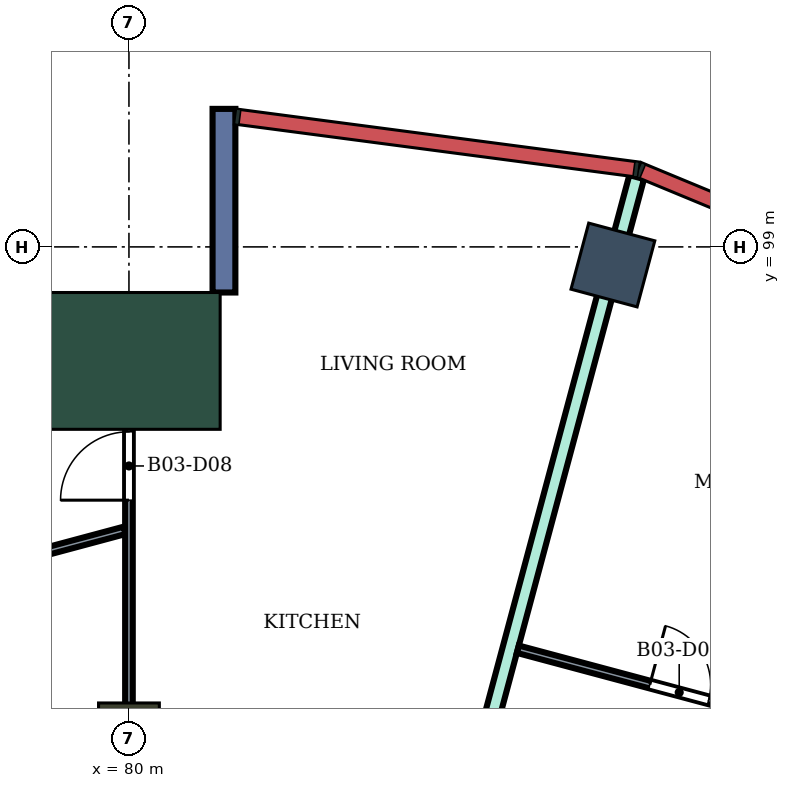
"""IFC4 building model, lengths in metres.
Left out: names, types, materials, properties, quantities, classifications, styles, units other than length and angle.
Written with IfcOpenShell. Run it as: python <this file> out.ifc"""

import sys

from ifc_helpers import new_model, si_unit, direction, frame, frame_2d, origin, origin_2d, place, context, subcontext, project, spatial, rectangle, extrude, element, fill, save


model = new_model("IFC4")
c1 = context("Model", 3, precision=1e-05, world=origin(), true_north=direction((0.0, 1.0)))
c2 = subcontext(c1, "Body", "Model", "MODEL_VIEW")
j1 = project(units=[si_unit("LENGTHUNIT", "METRE"), si_unit("PLANEANGLEUNIT", "RADIAN")], contexts=[c1])
p1 = place(None, origin())
s1 = spatial("IfcSite", under=j1, at=p1, CompositionType="ELEMENT")
p2 = place(p1, origin())
s2 = spatial("IfcBuilding", under=s1, at=p2, CompositionType="ELEMENT")
p3 = place(p2, frame((0.0, 0.0, 241.5)))
s3 = spatial("IfcBuildingStorey", under=s2, at=p3, CompositionType="ELEMENT", Elevation=241.5)
p4 = place(p3, frame((86.367, 98.762, 0.0), z_axis=(0.0, 0.0, 1.0), x_axis=(0.258819045103, 0.965925826289, 0.0)))
e1 = element("IfcColumn", 1, at=p4, inside=s3, PredefinedType="COLUMN", context=c2, shape_type="SweptSolid", body=[
    extrude(rectangle(XDim=0.9, YDim=0.9, at=origin_2d()), origin(), (0.0, 0.0, 1.0), 4.2),
])
p5 = place(p3, frame((80.0, 92.6, 0.0), z_axis=(0.0, 0.0, 1.0), x_axis=(0.0, 1.0, 0.0)))
e2 = element("IfcColumn", 2, at=p5, inside=s3, PredefinedType="COLUMN", context=c2, shape_type="SweptSolid", body=[
    extrude(rectangle(XDim=0.8, YDim=0.8, at=origin_2d()), origin(), (0.0, 0.0, 1.0), 4.2),
])
p6 = place(p3, frame((80.0, 97.5, 0.0), z_axis=(0.0, 0.0, 1.0), x_axis=(0.0, 1.0, 0.0)))
e3 = element("IfcColumn", 3, at=p6, inside=s3, PredefinedType="COLUMN", context=c2, shape_type="SweptSolid", body=[
    extrude(rectangle(XDim=1.8, YDim=2.4, at=origin_2d()), origin(), (0.0, 0.0, 1.0), 4.2),
])
p7 = place(p3, frame((81.25, 98.4, 0.0), z_axis=(0.0, 0.0, 1.0), x_axis=(0.0, 1.0, 0.0)))
e4 = element("IfcWall", 4, at=p7, inside=s3, PredefinedType="NOTDEFINED", context=c2, shape_type="SweptSolid", body=[
    extrude(rectangle(XDim=2.416, YDim=0.3, at=frame_2d((1.208, 0.0))), origin(), (0.0, 0.0, 1.0), 4.2),
])
p8 = place(p3, frame((83.335, 87.456, 0.0), z_axis=(0.0, 0.0, 1.0), x_axis=(0.259184958139, 0.965827705895, 0.0)))
e5 = element("IfcWall", 5, at=p8, inside=s3, PredefinedType="PARTITIONING", context=c2, shape_type="SweptSolid", body=[
    extrude(rectangle(XDim=12.904, YDim=0.2, at=frame_2d((6.452, 0.0))), origin(), (0.0, 0.0, 1.0), 3.75),
])
p9 = place(p3, frame((75.035, 93.955, 0.0), z_axis=(0.0, 0.0, 1.0), x_axis=(0.965868648254, 0.259032342228, 0.0)))
e6 = element("IfcWall", 6, at=p9, inside=s3, PredefinedType="PARTITIONING", context=c2, shape_type="SweptSolid", body=[
    extrude(rectangle(XDim=5.08, YDim=0.1, at=frame_2d((2.54, 0.0))), origin(), (0.0, 0.0, 1.0), 3.75),
])
p10 = place(p3, frame((80.0, 88.246, 0.0), z_axis=(0.0, 0.0, 1.0), x_axis=(0.0, 1.0, 0.0)))
e7 = element("IfcWall", 7, at=p10, inside=s3, PredefinedType="PARTITIONING", context=c2, shape_type="SweptSolid", body=[
    extrude(rectangle(XDim=9.954, YDim=0.1, at=frame_2d((4.977, 0.0))), origin(), (0.0, 0.0, 1.0), 3.75),
])
p11 = place(p10, frame((7.422, 0.0, 0.0)))
e8 = element("IfcOpeningElement", 8, at=p11, cuts=e7, PredefinedType="OPENING", context=c2, shape_type="SweptSolid", body=[
    extrude(rectangle(XDim=0.9, YDim=2.1, at=frame_2d((0.45, 1.05))), frame((0.0, 0.06, 0.0), z_axis=(0.0, -1.0, 0.0), x_axis=(1.0, 0.0, 0.0)), (0.0, 0.0, 1.0), 0.12),
])
p12 = place(p10, frame((3.12, 0.0, 0.0)))
e9 = element("IfcOpeningElement", 9, at=p12, cuts=e7, PredefinedType="OPENING", context=c2, shape_type="SweptSolid", body=[
    extrude(rectangle(XDim=0.8, YDim=2.1, at=frame_2d((0.4, 1.05))), frame((0.0, 0.06, 0.0), z_axis=(0.0, -1.0, 0.0), x_axis=(1.0, 0.0, 0.0)), (0.0, 0.0, 1.0), 0.12),
])
p13 = place(p3, frame((85.116, 93.707, 0.0), z_axis=(0.0, 0.0, 1.0), x_axis=(0.965979414561, -0.258618968068, 0.0)))
e10 = element("IfcWall", 10, at=p13, inside=s3, PredefinedType="PARTITIONING", context=c2, shape_type="SweptSolid", body=[
    extrude(rectangle(XDim=5.036, YDim=0.1, at=frame_2d((2.518, 0.0))), origin(), (0.0, 0.0, 1.0), 3.75),
])
p14 = place(p13, frame((1.798, 0.0, 0.0)))
e11 = element("IfcOpeningElement", 11, at=p14, cuts=e10, PredefinedType="OPENING", context=c2, shape_type="SweptSolid", body=[
    extrude(rectangle(XDim=0.8, YDim=2.1, at=frame_2d((0.4, 1.05))), frame((0.0, 0.06, 0.0), z_axis=(0.0, -1.0, 0.0), x_axis=(1.0, 0.0, 0.0)), (0.0, 0.0, 1.0), 0.12),
])
p15 = place(p3, frame((86.671, 86.554, 0.0), z_axis=(0.0, 0.0, 1.0), x_axis=(0.500104188531, 0.865965242151, 0.0)))
e12 = element("IfcWall", 12, at=p15, inside=s3, PredefinedType="PARTITIONING", context=c2, shape_type="SweptSolid", body=[
    extrude(rectangle(XDim=12.456, YDim=0.1, at=frame_2d((6.228, 0.0))), origin(), (0.0, 0.0, 1.0), 3.75),
])
p16 = place(p15, frame((9.111, 0.0, 0.0)))
e13 = element("IfcOpeningElement", 13, at=p16, cuts=e12, PredefinedType="OPENING", context=c2, shape_type="SweptSolid", body=[
    extrude(rectangle(XDim=0.9, YDim=2.1, at=frame_2d((0.45, 1.05))), frame((0.0, 0.06, 0.0), z_axis=(0.0, -1.0, 0.0), x_axis=(1.0, 0.0, 0.0)), (0.0, 0.0, 1.0), 0.12),
])
p17 = place(p14, origin())
e14 = element("IfcDoor", 14, at=p17, inside=s3, OperationType="SINGLE_SWING_LEFT", PredefinedType="DOOR", context=c2, shape_type="SweptSolid", body=[
    extrude(rectangle(XDim=0.8, YDim=2.1, at=frame_2d((0.4, 1.05))), frame((0.0, 0.025, 0.0), z_axis=(0.0, -1.0, 0.0), x_axis=(1.0, 0.0, 0.0)), (0.0, 0.0, 1.0), 0.05),
])
fill(e11, e14)
p18 = place(p11, origin())
e15 = element("IfcDoor", 15, at=p18, inside=s3, OperationType="SINGLE_SWING_LEFT", PredefinedType="DOOR", context=c2, shape_type="SweptSolid", body=[
    extrude(rectangle(XDim=0.9, YDim=2.1, at=frame_2d((0.45, 1.05))), frame((0.0, 0.025, 0.0), z_axis=(0.0, -1.0, 0.0), x_axis=(1.0, 0.0, 0.0)), (0.0, 0.0, 1.0), 0.05),
])
fill(e8, e15)
save(model, sys.argv[1])
